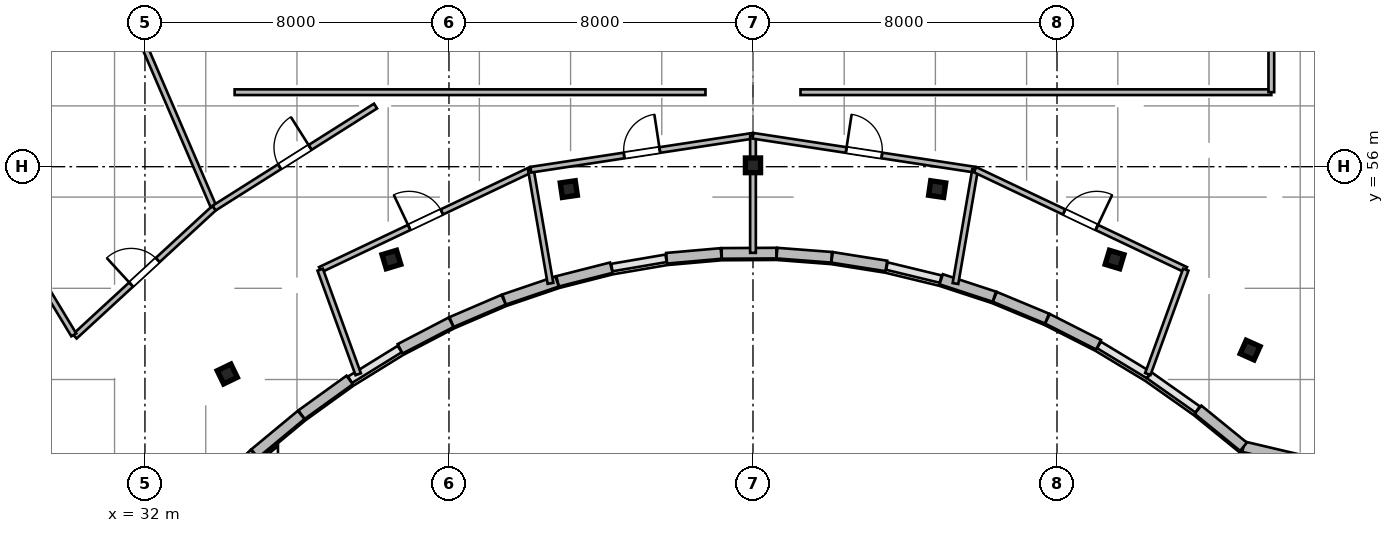
"""IFC4 building model, lengths in metres.
Left out: names, types, materials, properties, quantities, classifications, styles, units other than length and angle.
Written with IfcOpenShell. Run it as: python <this file> out.ifc"""

import sys

from ifc_helpers import new_model, si_unit, direction, frame, frame_2d, origin, origin_2d, place, context, subcontext, project, spatial, rectangle, i_section, extrude, source, transform, mapped, element, fill, save


model = new_model("IFC4")
c1 = context("Model", 3, precision=1e-05, world=origin(), true_north=direction((0.0, 1.0)))
c2 = subcontext(c1, "Body", "Model", "MODEL_VIEW")
j1 = project(units=[si_unit("LENGTHUNIT", "METRE"), si_unit("PLANEANGLEUNIT", "RADIAN")], contexts=[c1])
p1 = place(None, origin())
s1 = spatial("IfcSite", under=j1, at=p1, CompositionType="ELEMENT")
p2 = place(p1, origin())
s2 = spatial("IfcBuilding", under=s1, at=p2, CompositionType="ELEMENT")
p3 = place(p2, frame((0.0, 0.0, 275.7)))
s3 = spatial("IfcBuildingStorey", under=s2, at=p3, CompositionType="ELEMENT", Elevation=275.7)
m1 = source(origin(), c2, "Body", "SweptSolid", [
    extrude(i_section(OverallWidth=0.399, OverallDepth=0.387, WebThickness=0.021, FlangeThickness=0.033, at=origin_2d()), origin(), (0.0, 0.0, 1.0), 3.9),
])
for number, where, z_axis, x_axis in (
    (1, (34.166, 50.545, 0.0), (0.0, 0.0, 1.0), (-0.436, 0.9, 0.0)),
    (2, (38.485, 53.558, 0.0), (0.0, 0.0, 1.0), (-0.289, 0.957, 0.0)),
    (3, (43.154, 55.411, 0.0), (0.0, 0.0, 1.0), (-0.143, 0.99, 0.0)),
    (4, (48.0, 56.036, 0.0), (0.0, 0.0, 1.0), (0.0, 1.0, 0.0)),
    (5, (52.846, 55.411, 0.0), (0.0, 0.0, 1.0), (0.143, 0.99, 0.0)),
    (6, (57.515, 53.558, 0.0), (0.0, 0.0, 1.0), (0.289, 0.957, 0.0)),
    (7, (61.082, 51.175, 0.0), (0.0, 0.0, 1.0), (0.409, 0.912, 0.0)),
):
    element("IfcColumn", number, at=place(p3, frame(where, z_axis=z_axis, x_axis=x_axis)), inside=s3, PredefinedType="COLUMN", context=c2, shape_type="MappedRepresentation", body=[
        mapped(m1, transform((0.0, 0.0, 0.0), scale=1.0)),
    ])
m2 = source(origin(), c2, "Body", "SweptSolid", [
    extrude(rectangle(XDim=4.547, YDim=0.28, at=frame_2d((2.273, 0.0))), origin(), (0.0, 0.0, 1.0), 3.64),
])
p4 = place(p3, frame((65.333, 47.589, 0.0), z_axis=(0.0, 0.0, 1.0), x_axis=(-0.973332593516, 0.229398479505, 0.0)))
e8 = element("IfcWall", 8, at=p4, inside=s3, PredefinedType="SOLIDWALL", context=c2, shape_type="MappedRepresentation", body=[
    mapped(m2, transform((0.0, 0.0, 0.0), scale=1.0)),
])
p5 = place(p4, frame((0.16, 0.0, 0.95)))
e9 = element("IfcOpeningElement", 9, at=p5, cuts=e8, PredefinedType="OPENING", context=c2, shape_type="SweptSolid", body=[
    extrude(rectangle(XDim=2.2, YDim=2.1, at=frame_2d((1.1, 1.05))), frame((0.0, 0.15, 0.0), z_axis=(0.0, -1.0, 0.0), x_axis=(1.0, 0.0, 0.0)), (0.0, 0.0, 1.0), 0.3),
])
m3 = source(origin(), c2, "Body", "SweptSolid", [
    extrude(rectangle(XDim=1.543, YDim=0.28, at=frame_2d((0.772, 0.0))), origin(), (0.0, 0.0, 1.0), 3.64),
])
p6 = place(p3, frame((60.908, 48.632, 0.0), z_axis=(0.0, 0.0, 1.0), x_axis=(-0.77582846857, 0.63094388606, 0.0)))
e10 = element("IfcWall", 10, at=p6, inside=s3, PredefinedType="SOLIDWALL", context=c2, shape_type="MappedRepresentation", body=[
    mapped(m3, transform((0.0, 0.0, 0.0), scale=1.0)),
])
m4 = source(origin(), c2, "Body", "SweptSolid", [
    extrude(rectangle(XDim=1.509, YDim=0.28, at=frame_2d((0.754, 0.0))), origin(), (0.0, 0.0, 1.0), 3.64),
])
p7 = place(p3, frame((57.094, 51.315, 0.0), z_axis=(0.0, 0.0, 1.0), x_axis=(-0.89169189228, 0.452642871635, 0.0)))
e11 = element("IfcWall", 11, at=p7, inside=s3, PredefinedType="SOLIDWALL", context=c2, shape_type="MappedRepresentation", body=[
    mapped(m4, transform((0.0, 0.0, 0.0), scale=1.0)),
])
m5 = source(origin(), c2, "Body", "SweptSolid", [
    extrude(rectangle(XDim=1.488, YDim=0.28, at=frame_2d((0.744, 0.0))), origin(), (0.0, 0.0, 1.0), 3.64),
])
p8 = place(p3, frame((55.736, 52.004, 0.0), z_axis=(0.0, 0.0, 1.0), x_axis=(-0.923261314935, 0.384172545017, 0.0)))
e12 = element("IfcWall", 12, at=p8, inside=s3, PredefinedType="SOLIDWALL", context=c2, shape_type="MappedRepresentation", body=[
    mapped(m5, transform((0.0, 0.0, 0.0), scale=1.0)),
])
m6 = source(origin(), c2, "Body", "SweptSolid", [
    extrude(rectangle(XDim=1.47, YDim=0.28, at=frame_2d((0.735, 0.0))), origin(), (0.0, 0.0, 1.0), 3.64),
])
p9 = place(p3, frame((54.35, 52.58, 0.0), z_axis=(0.0, 0.0, 1.0), x_axis=(-0.950248878954, 0.311491682145, 0.0)))
e13 = element("IfcWall", 13, at=p9, inside=s3, PredefinedType="SOLIDWALL", context=c2, shape_type="MappedRepresentation", body=[
    mapped(m6, transform((0.0, 0.0, 0.0), scale=1.0)),
])
m7 = source(origin(), c2, "Body", "SweptSolid", [
    extrude(rectangle(XDim=1.446, YDim=0.28, at=frame_2d((0.723, 0.0))), origin(), (0.0, 0.0, 1.0), 3.64),
])
p10 = place(p3, frame((51.509, 53.388, 0.0), z_axis=(0.0, 0.0, 1.0), x_axis=(-0.987650460941, 0.156673440642, 0.0)))
e14 = element("IfcWall", 14, at=p10, inside=s3, PredefinedType="SOLIDWALL", context=c2, shape_type="MappedRepresentation", body=[
    mapped(m7, transform((0.0, 0.0, 0.0), scale=1.0)),
])
m8 = source(origin(), c2, "Body", "SweptSolid", [
    extrude(rectangle(XDim=1.44, YDim=0.28, at=frame_2d((0.72, 0.0))), origin(), (0.0, 0.0, 1.0), 3.64),
])
p11 = place(p3, frame((50.066, 53.616, 0.0), z_axis=(0.0, 0.0, 1.0), x_axis=(-0.997124860794, 0.075776064736, 0.0)))
e15 = element("IfcWall", 15, at=p11, inside=s3, PredefinedType="SOLIDWALL", context=c2, shape_type="MappedRepresentation", body=[
    mapped(m8, transform((0.0, 0.0, 0.0), scale=1.0)),
])
m9 = source(origin(), c2, "Body", "SweptSolid", [
    extrude(rectangle(XDim=1.438, YDim=0.28, at=frame_2d((0.719, 0.0))), origin(), (0.0, 0.0, 1.0), 3.64),
])
p12 = place(p3, frame((48.615, 53.726, 0.0), z_axis=(0.0, 0.0, 1.0), x_axis=(-0.999982357135, -0.005940153174, 0.0)))
e16 = element("IfcWall", 16, at=p12, inside=s3, PredefinedType="SOLIDWALL", context=c2, shape_type="MappedRepresentation", body=[
    mapped(m9, transform((0.0, 0.0, 0.0), scale=1.0)),
])
m10 = source(origin(), c2, "Body", "SweptSolid", [
    extrude(rectangle(XDim=1.441, YDim=0.28, at=frame_2d((0.72, 0.0))), origin(), (0.0, 0.0, 1.0), 3.64),
])
p13 = place(p3, frame((47.162, 53.717, 0.0), z_axis=(0.0, 0.0, 1.0), x_axis=(-0.99617032352, -0.087433898101, 0.0)))
e17 = element("IfcWall", 17, at=p13, inside=s3, PredefinedType="SOLIDWALL", context=c2, shape_type="MappedRepresentation", body=[
    mapped(m10, transform((0.0, 0.0, 0.0), scale=1.0)),
])
m11 = source(origin(), c2, "Body", "SweptSolid", [
    extrude(rectangle(XDim=1.458, YDim=0.28, at=frame_2d((0.729, 0.0))), origin(), (0.0, 0.0, 1.0), 3.64),
])
p14 = place(p3, frame((44.271, 53.343, 0.0), z_axis=(0.0, 0.0, 1.0), x_axis=(-0.969109544438, -0.246630677083, 0.0)))
e18 = element("IfcWall", 18, at=p14, inside=s3, PredefinedType="SOLIDWALL", context=c2, shape_type="MappedRepresentation", body=[
    mapped(m11, transform((0.0, 0.0, 0.0), scale=1.0)),
])
m12 = source(origin(), c2, "Body", "SweptSolid", [
    extrude(rectangle(XDim=1.473, YDim=0.28, at=frame_2d((0.736, 0.0))), origin(), (0.0, 0.0, 1.0), 3.64),
])
p15 = place(p3, frame((42.845, 52.979, 0.0), z_axis=(0.0, 0.0, 1.0), x_axis=(-0.946641296917, -0.322289086026, 0.0)))
e19 = element("IfcWall", 19, at=p15, inside=s3, PredefinedType="SOLIDWALL", context=c2, shape_type="MappedRepresentation", body=[
    mapped(m12, transform((0.0, 0.0, 0.0), scale=1.0)),
])
m13 = source(origin(), c2, "Body", "SweptSolid", [
    extrude(rectangle(XDim=1.49, YDim=0.28, at=frame_2d((0.745, 0.0))), origin(), (0.0, 0.0, 1.0), 3.64),
])
p16 = place(p3, frame((41.438, 52.5, 0.0), z_axis=(0.0, 0.0, 1.0), x_axis=(-0.919009427656, -0.394235553799, 0.0)))
e20 = element("IfcWall", 20, at=p16, inside=s3, PredefinedType="SOLIDWALL", context=c2, shape_type="MappedRepresentation", body=[
    mapped(m13, transform((0.0, 0.0, 0.0), scale=1.0)),
])
m14 = source(origin(), c2, "Body", "SweptSolid", [
    extrude(rectangle(XDim=1.512, YDim=0.28, at=frame_2d((0.756, 0.0))), origin(), (0.0, 0.0, 1.0), 3.64),
])
p17 = place(p3, frame((40.056, 51.906, 0.0), z_axis=(0.0, 0.0, 1.0), x_axis=(-0.886841011195, -0.462074691865, 0.0)))
e21 = element("IfcWall", 21, at=p17, inside=s3, PredefinedType="SOLIDWALL", context=c2, shape_type="MappedRepresentation", body=[
    mapped(m14, transform((0.0, 0.0, 0.0), scale=1.0)),
])
m15 = source(origin(), c2, "Body", "SweptSolid", [
    extrude(rectangle(XDim=1.561, YDim=0.28, at=frame_2d((0.781, 0.0))), origin(), (0.0, 0.0, 1.0), 3.64),
])
p18 = place(p3, frame((37.387, 50.387, 0.0), z_axis=(0.0, 0.0, 1.0), x_axis=(-0.81154027425, -0.584296485758, 0.0)))
e22 = element("IfcWall", 22, at=p18, inside=s3, PredefinedType="SOLIDWALL", context=c2, shape_type="MappedRepresentation", body=[
    mapped(m15, transform((0.0, 0.0, 0.0), scale=1.0)),
])
m16 = source(origin(), c2, "Body", "SweptSolid", [
    extrude(rectangle(XDim=1.589, YDim=0.28, at=frame_2d((0.794, 0.0))), origin(), (0.0, 0.0, 1.0), 3.64),
])
p19 = place(p3, frame((36.11, 49.468, 0.0), z_axis=(0.0, 0.0, 1.0), x_axis=(-0.769805836273, -0.63827813251, 0.0)))
e23 = element("IfcWall", 23, at=p19, inside=s3, PredefinedType="SOLIDWALL", context=c2, shape_type="MappedRepresentation", body=[
    mapped(m16, transform((0.0, 0.0, 0.0), scale=1.0)),
])
m17 = source(origin(), c2, "Body", "SweptSolid", [
    extrude(rectangle(XDim=1.577, YDim=0.28, at=frame_2d((0.789, 0.0))), origin(), (0.0, 0.0, 1.0), 3.64),
])
p20 = place(p3, frame((34.878, 48.446, 0.0), z_axis=(0.0, 0.0, 1.0), x_axis=(-0.726119464467, -0.687568558998, 0.0)))
e24 = element("IfcWall", 24, at=p20, inside=s3, PredefinedType="SOLIDWALL", context=c2, shape_type="MappedRepresentation", body=[
    mapped(m17, transform((0.0, 0.0, 0.0), scale=1.0)),
])
m18 = source(origin(), c2, "Body", "SweptSolid", [
    extrude(rectangle(XDim=6.137, YDim=0.15, at=frame_2d((3.069, 0.0))), origin(), (0.0, 0.0, 1.0), 3.64),
])
p21 = place(p3, frame((36.611, 53.29, 0.0), z_axis=(0.0, 0.0, 1.0), x_axis=(0.903442784804, 0.428708682657, 0.0)))
e25 = element("IfcWall", 25, at=p21, inside=s3, PredefinedType="PARTITIONING", context=c2, shape_type="MappedRepresentation", body=[
    mapped(m18, transform((0.0, 0.0, 0.0), scale=1.0)),
])
p22 = place(p21, frame((2.594, 0.0, 0.0)))
e26 = element("IfcOpeningElement", 26, at=p22, cuts=e25, PredefinedType="OPENING", context=c2, shape_type="SweptSolid", body=[
    extrude(rectangle(XDim=0.95, YDim=2.1, at=frame_2d((0.475, 1.05))), frame((0.0, 0.085, 0.0), z_axis=(0.0, -1.0, 0.0), x_axis=(1.0, 0.0, 0.0)), (0.0, 0.0, 1.0), 0.17),
])
m19 = source(origin(), c2, "Body", "SweptSolid", [
    extrude(rectangle(XDim=2.927, YDim=0.15, at=frame_2d((1.464, 0.0))), origin(), (0.0, 0.0, 1.0), 3.64),
])
p23 = place(p3, frame((37.612, 50.539, 0.0), z_axis=(0.0, 0.0, 1.0), x_axis=(-0.342030996507, 0.93968867048, 0.0)))
e27 = element("IfcWall", 27, at=p23, inside=s3, PredefinedType="PARTITIONING", context=c2, shape_type="MappedRepresentation", body=[
    mapped(m19, transform((0.0, 0.0, 0.0), scale=1.0)),
])
m20 = source(origin(), c2, "Body", "SweptSolid", [
    extrude(rectangle(XDim=3.034, YDim=0.15, at=frame_2d((1.517, 0.0))), origin(), (0.0, 0.0, 1.0), 3.64),
])
p24 = place(p3, frame((42.671, 52.931, 0.0), z_axis=(0.0, 0.0, 1.0), x_axis=(-0.169785657008, 0.985481014873, 0.0)))
e28 = element("IfcWall", 28, at=p24, inside=s3, PredefinedType="PARTITIONING", context=c2, shape_type="MappedRepresentation", body=[
    mapped(m20, transform((0.0, 0.0, 0.0), scale=1.0)),
])
m21 = source(origin(), c2, "Body", "SweptSolid", [
    extrude(rectangle(XDim=5.912, YDim=0.15, at=frame_2d((2.956, 0.0))), origin(), (0.0, 0.0, 1.0), 3.64),
])
p25 = place(p3, frame((42.156, 55.921, 0.0), z_axis=(0.0, 0.0, 1.0), x_axis=(0.98854340791, 0.150936843342, 0.0)))
e29 = element("IfcWall", 29, at=p25, inside=s3, PredefinedType="PARTITIONING", context=c2, shape_type="MappedRepresentation", body=[
    mapped(m21, transform((0.0, 0.0, 0.0), scale=1.0)),
])
p26 = place(p25, frame((2.481, 0.0, 0.0)))
e30 = element("IfcOpeningElement", 30, at=p26, cuts=e29, PredefinedType="OPENING", context=c2, shape_type="SweptSolid", body=[
    extrude(rectangle(XDim=0.95, YDim=2.1, at=frame_2d((0.475, 1.05))), frame((0.0, 0.085, 0.0), z_axis=(0.0, -1.0, 0.0), x_axis=(1.0, 0.0, 0.0)), (0.0, 0.0, 1.0), 0.17),
])
m22 = source(origin(), c2, "Body", "SweptSolid", [
    extrude(rectangle(XDim=3.081, YDim=0.15, at=frame_2d((1.54, 0.0))), origin(), (0.0, 0.0, 1.0), 3.314),
])
p27 = place(p3, frame((48.0, 53.733, 0.0), z_axis=(0.0, 0.0, 1.0), x_axis=(0.0, 1.0, 0.0)))
e31 = element("IfcWall", 31, at=p27, inside=s3, PredefinedType="PARTITIONING", context=c2, shape_type="MappedRepresentation", body=[
    mapped(m22, transform((0.0, 0.0, 0.0), scale=1.0)),
])
p28 = place(p3, frame((48.0, 56.813, 0.0), z_axis=(0.0, 0.0, 1.0), x_axis=(0.98854340791, -0.150936843342, 0.0)))
e32 = element("IfcWall", 32, at=p28, inside=s3, PredefinedType="PARTITIONING", context=c2, shape_type="MappedRepresentation", body=[
    mapped(m21, transform((0.0, 0.0, 0.0), scale=1.0)),
])
p29 = place(p28, frame((2.481, 0.0, 0.0)))
e33 = element("IfcOpeningElement", 33, at=p29, cuts=e32, PredefinedType="OPENING", context=c2, shape_type="SweptSolid", body=[
    extrude(rectangle(XDim=0.95, YDim=2.1, at=frame_2d((0.475, 1.05))), frame((0.0, 0.085, 0.0), z_axis=(0.0, -1.0, 0.0), x_axis=(1.0, 0.0, 0.0)), (0.0, 0.0, 1.0), 0.17),
])
m23 = source(origin(), c2, "Body", "SweptSolid", [
    extrude(rectangle(XDim=3.039, YDim=0.15, at=frame_2d((1.52, 0.0))), origin(), (0.0, 0.0, 1.0), 3.64),
])
p30 = place(p3, frame((53.328, 52.926, 0.0), z_axis=(0.0, 0.0, 1.0), x_axis=(0.169815455764, 0.985475880468, 0.0)))
e34 = element("IfcWall", 34, at=p30, inside=s3, PredefinedType="PARTITIONING", context=c2, shape_type="MappedRepresentation", body=[
    mapped(m23, transform((0.0, 0.0, 0.0), scale=1.0)),
])
p31 = place(p3, frame((53.844, 55.921, 0.0), z_axis=(0.0, 0.0, 1.0), x_axis=(0.903442784804, -0.428708682657, 0.0)))
e35 = element("IfcWall", 35, at=p31, inside=s3, PredefinedType="PARTITIONING", context=c2, shape_type="MappedRepresentation", body=[
    mapped(m18, transform((0.0, 0.0, 0.0), scale=1.0)),
])
p32 = place(p31, frame((2.594, 0.0, 0.0)))
e36 = element("IfcOpeningElement", 36, at=p32, cuts=e35, PredefinedType="OPENING", context=c2, shape_type="SweptSolid", body=[
    extrude(rectangle(XDim=0.95, YDim=2.1, at=frame_2d((0.475, 1.05))), frame((0.0, 0.085, 0.0), z_axis=(0.0, -1.0, 0.0), x_axis=(1.0, 0.0, 0.0)), (0.0, 0.0, 1.0), 0.17),
])
m24 = source(origin(), c2, "Body", "SweptSolid", [
    extrude(rectangle(XDim=2.921, YDim=0.15, at=frame_2d((1.46, 0.0))), origin(), (0.0, 0.0, 1.0), 3.64),
])
p33 = place(p3, frame((58.39, 50.545, 0.0), z_axis=(0.0, 0.0, 1.0), x_axis=(0.34203834657, 0.939685995147, 0.0)))
e37 = element("IfcWall", 37, at=p33, inside=s3, PredefinedType="PARTITIONING", context=c2, shape_type="MappedRepresentation", body=[
    mapped(m24, transform((0.0, 0.0, 0.0), scale=1.0)),
])
m25 = source(origin(), c2, "Body", "SweptSolid", [
    extrude(rectangle(XDim=4.986, YDim=0.15, at=frame_2d((2.493, 0.0))), origin(), (0.0, 0.0, 1.0), 3.64),
])
p34 = place(p3, frame((30.153, 51.533, 0.0), z_axis=(0.0, 0.0, 1.0), x_axis=(0.735595190169, 0.677421372707, 0.0)))
e38 = element("IfcWall", 38, at=p34, inside=s3, PredefinedType="PARTITIONING", context=c2, shape_type="MappedRepresentation", body=[
    mapped(m25, transform((0.0, 0.0, 0.0), scale=1.0)),
])
p35 = place(p34, frame((2.018, 0.0, 0.0)))
e39 = element("IfcOpeningElement", 39, at=p35, cuts=e38, PredefinedType="OPENING", context=c2, shape_type="SweptSolid", body=[
    extrude(rectangle(XDim=0.95, YDim=2.1, at=frame_2d((0.475, 1.05))), frame((0.0, 0.085, 0.0), z_axis=(0.0, -1.0, 0.0), x_axis=(1.0, 0.0, 0.0)), (0.0, 0.0, 1.0), 0.17),
])
m26 = source(origin(), c2, "Body", "SweptSolid", [
    extrude(rectangle(XDim=16.121, YDim=0.15, at=frame_2d((8.061, 0.0))), origin(), (0.0, 0.0, 1.0), 3.64),
])
p36 = place(p3, frame((30.127, 51.575, 0.0), z_axis=(0.0, 0.0, 1.0), x_axis=(-0.517212483904, 0.855857024563, 0.0)))
e40 = element("IfcWall", 40, at=p36, inside=s3, PredefinedType="PARTITIONING", context=c2, shape_type="MappedRepresentation", body=[
    mapped(m26, transform((0.0, 0.0, 0.0), scale=1.0)),
])
m27 = source(origin(), c2, "Body", "SweptSolid", [
    extrude(rectangle(XDim=17.556, YDim=0.15, at=frame_2d((8.778, 0.0))), origin(), (0.0, 0.0, 1.0), 3.64),
])
p37 = place(p3, frame((33.8, 54.958, 0.0), z_axis=(0.0, 0.0, 1.0), x_axis=(-0.395687598313, 0.918385172213, 0.0)))
e41 = element("IfcWall", 41, at=p37, inside=s3, PredefinedType="PARTITIONING", context=c2, shape_type="MappedRepresentation", body=[
    mapped(m27, transform((0.0, 0.0, 0.0), scale=1.0)),
])
m28 = source(origin(), c2, "Body", "SweptSolid", [
    extrude(rectangle(XDim=5.025, YDim=0.15, at=frame_2d((2.513, 0.0))), origin(), (0.0, 0.0, 1.0), 3.64),
])
p38 = place(p3, frame((33.82, 54.911, 0.0), z_axis=(0.0, 0.0, 1.0), x_axis=(0.84532378062, 0.534254345717, 0.0)))
e42 = element("IfcWall", 42, at=p38, inside=s3, PredefinedType="PARTITIONING", context=c2, shape_type="MappedRepresentation", body=[
    mapped(m28, transform((0.0, 0.0, 0.0), scale=1.0)),
])
p39 = place(p38, frame((2.038, 0.0, 0.0)))
e43 = element("IfcOpeningElement", 43, at=p39, cuts=e42, PredefinedType="OPENING", context=c2, shape_type="SweptSolid", body=[
    extrude(rectangle(XDim=0.95, YDim=2.1, at=frame_2d((0.475, 1.05))), frame((0.0, 0.085, 0.0), z_axis=(0.0, -1.0, 0.0), x_axis=(1.0, 0.0, 0.0)), (0.0, 0.0, 1.0), 0.17),
])
m29 = source(origin(), c2, "Body", "SweptSolid", [
    extrude(rectangle(XDim=12.39, YDim=0.15, at=frame_2d((6.195, 0.0))), origin(), (0.0, 0.0, 1.0), 3.27),
])
for number, where, z_axis, x_axis in (
    (44, (34.36, 57.96, 0.0), (0.0, 0.0, 1.0), (1.0, 0.0, 0.0)),
    (45, (49.25, 57.96, 0.0), (0.0, 0.0, 1.0), (1.0, 0.0, 0.0)),
):
    element("IfcWall", number, at=place(p3, frame(where, z_axis=z_axis, x_axis=x_axis)), inside=s3, PredefinedType="PARTITIONING", context=c2, shape_type="MappedRepresentation", body=[
        mapped(m29, transform((0.0, 0.0, 0.0), scale=1.0)),
    ])
m30 = source(origin(), c2, "Body", "SweptSolid", [
    extrude(rectangle(XDim=5.04, YDim=0.15, at=frame_2d((2.52, 0.0))), origin(), (0.0, 0.0, 1.0), 3.64),
])
p40 = place(p3, frame((61.64, 57.96, 0.0), z_axis=(0.0, 0.0, 1.0), x_axis=(0.0, 1.0, 0.0)))
e46 = element("IfcWall", 46, at=p40, inside=s3, PredefinedType="PARTITIONING", context=c2, shape_type="MappedRepresentation", body=[
    mapped(m30, transform((0.0, 0.0, 0.0), scale=1.0)),
])
p41 = place(p40, frame((1.44, 0.0, 0.0)))
e47 = element("IfcOpeningElement", 47, at=p41, cuts=e46, PredefinedType="OPENING", context=c2, shape_type="SweptSolid", body=[
    extrude(rectangle(XDim=0.95, YDim=2.1, at=frame_2d((0.475, 1.05))), frame((0.0, 0.085, 0.0), z_axis=(0.0, -1.0, 0.0), x_axis=(1.0, 0.0, 0.0)), (0.0, 0.0, 1.0), 0.17),
])
m31 = source(origin(), c2, "Body", "SweptSolid", [
    extrude(rectangle(XDim=0.95, YDim=2.1, at=frame_2d((0.475, 1.05))), frame((0.0, 0.025, 0.0), z_axis=(0.0, -1.0, 0.0), x_axis=(1.0, 0.0, 0.0)), (0.0, 0.0, 1.0), 0.05),
])
p42 = place(p22, origin())
e48 = element("IfcDoor", 48, at=p42, inside=s3, OperationType="SINGLE_SWING_LEFT", PredefinedType="DOOR", context=c2, shape_type="MappedRepresentation", body=[
    mapped(m31, transform((0.0, 0.0, 0.0), scale=1.0)),
])
fill(e26, e48)
p43 = place(p26, origin())
e49 = element("IfcDoor", 49, at=p43, inside=s3, OperationType="SINGLE_SWING_RIGHT", PredefinedType="DOOR", context=c2, shape_type="MappedRepresentation", body=[
    mapped(m31, transform((0.0, 0.0, 0.0), scale=1.0)),
])
fill(e30, e49)
p44 = place(p29, origin())
e50 = element("IfcDoor", 50, at=p44, inside=s3, OperationType="SINGLE_SWING_LEFT", PredefinedType="DOOR", context=c2, shape_type="MappedRepresentation", body=[
    mapped(m31, transform((0.0, 0.0, 0.0), scale=1.0)),
])
fill(e33, e50)
p45 = place(p32, origin())
e51 = element("IfcDoor", 51, at=p45, inside=s3, OperationType="SINGLE_SWING_RIGHT", PredefinedType="DOOR", context=c2, shape_type="MappedRepresentation", body=[
    mapped(m31, transform((0.0, 0.0, 0.0), scale=1.0)),
])
fill(e36, e51)
p46 = place(p35, origin())
e52 = element("IfcDoor", 52, at=p46, inside=s3, OperationType="SINGLE_SWING_LEFT", PredefinedType="DOOR", context=c2, shape_type="MappedRepresentation", body=[
    mapped(m31, transform((0.0, 0.0, 0.0), scale=1.0)),
])
fill(e39, e52)
p47 = place(p39, origin())
e53 = element("IfcDoor", 53, at=p47, inside=s3, OperationType="SINGLE_SWING_RIGHT", PredefinedType="DOOR", context=c2, shape_type="MappedRepresentation", body=[
    mapped(m31, transform((0.0, 0.0, 0.0), scale=1.0)),
])
fill(e43, e53)
save(model, sys.argv[1])
